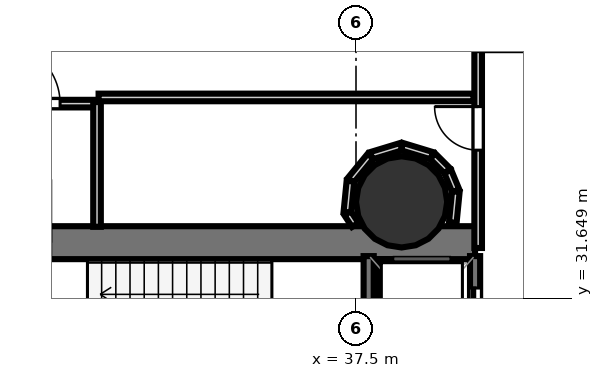
"""IFC4 building model, lengths in metres.
Left out: names, types, materials, properties, quantities, classifications, styles, units other than length and angle.
Written with IfcOpenShell. Run it as: python <this file> out.ifc"""

import sys

from ifc_helpers import new_model, si_unit, direction, frame, frame_2d, origin, origin_2d, place, context, subcontext, project, spatial, rectangle, hollow_circle, extrude, element, fill, save


model = new_model("IFC4")
c1 = context("Model", 3, precision=1e-05, world=origin(), true_north=direction((0.0, 1.0)))
c2 = subcontext(c1, "Body", "Model", "MODEL_VIEW")
j1 = project(units=[si_unit("LENGTHUNIT", "METRE"), si_unit("PLANEANGLEUNIT", "RADIAN")], contexts=[c1])
p1 = place(None, origin())
s1 = spatial("IfcSite", under=j1, at=p1, CompositionType="ELEMENT")
p2 = place(p1, origin())
s2 = spatial("IfcBuilding", under=s1, at=p2, CompositionType="ELEMENT")
p3 = place(p2, frame((0.0, 0.0, 47.9)))
s3 = spatial("IfcBuildingStorey", under=s2, at=p3, CompositionType="ELEMENT", Elevation=47.9)
p4 = place(p3, frame((29.13, 32.745, 0.0), z_axis=(0.0, 0.0, 1.0), x_axis=(1.0, 0.0, 0.0)))
e1 = element("IfcWall", 1, at=p4, inside=s3, PredefinedType="SHEAR", context=c2, shape_type="SweptSolid", body=[
    extrude(rectangle(XDim=10.72, YDim=0.65, at=frame_2d((5.36, 0.0))), origin(), (0.0, 0.0, 1.0), 4.42),
])
p5 = place(p4, frame((1.095, 0.0, 0.0)))
e2 = element("IfcOpeningElement", 2, at=p5, cuts=e1, PredefinedType="OPENING", context=c2, shape_type="SweptSolid", body=[
    extrude(rectangle(XDim=1.25, YDim=2.15, at=frame_2d((0.625, 1.075))), frame((0.0, 0.335, 0.0), z_axis=(0.0, -1.0, 0.0), x_axis=(1.0, 0.0, 0.0)), (0.0, 0.0, 1.0), 0.67),
])
p6 = place(p3, frame((38.18, 24.98, 0.0), z_axis=(0.0, 0.0, 1.0), x_axis=(0.0, 1.0, 0.0)))
e3 = element("IfcWall", 3, at=p6, inside=s3, PredefinedType="SHEAR", context=c2, shape_type="SweptSolid", body=[
    extrude(rectangle(XDim=7.44, YDim=0.5, at=frame_2d((3.72, 0.0))), origin(), (0.0, 0.0, 1.0), 4.42),
])
p7 = place(p3, frame((38.4, 33.55, 0.0), z_axis=(0.0, 0.0, 1.0), x_axis=(1.0, 0.0, 0.0)))
e4 = element("IfcColumn", 4, at=p7, inside=s3, PredefinedType="COLUMN", context=c2, shape_type="SweptSolid", body=[
    extrude(hollow_circle(Radius=0.9, WallThickness=0.045, at=origin_2d()), origin(), (0.0, 0.0, 1.0), 4.6),
])
p8 = place(p3, frame((39.85, 30.12, 0.0), z_axis=(0.0, 0.0, 1.0), x_axis=(0.0, 1.0, 0.0)))
e5 = element("IfcWall", 5, at=p8, inside=s3, PredefinedType="SOLIDWALL", context=c2, shape_type="SweptSolid", body=[
    extrude(rectangle(XDim=2.36, YDim=0.2, at=frame_2d((1.18, 0.0))), origin(), (0.0, 0.0, 1.0), 4.42),
])
p9 = place(p8, frame((0.63, 0.0, 0.0)))
e6 = element("IfcOpeningElement", 6, at=p9, cuts=e5, PredefinedType="OPENING", context=c2, shape_type="SweptSolid", body=[
    extrude(rectangle(XDim=1.1, YDim=2.15, at=frame_2d((0.55, 1.075))), frame((0.0, 0.11, 0.0), z_axis=(0.0, -1.0, 0.0), x_axis=(1.0, 0.0, 0.0)), (0.0, 0.0, 1.0), 0.22),
])
p10 = place(p3, frame((37.75, 30.12, 0.0), z_axis=(0.0, 0.0, 1.0), x_axis=(0.0, 1.0, 0.0)))
e7 = element("IfcWall", 7, at=p10, inside=s3, PredefinedType="SOLIDWALL", context=c2, shape_type="SweptSolid", body=[
    extrude(rectangle(XDim=2.36, YDim=0.2, at=frame_2d((1.18, 0.0))), origin(), (0.0, 0.0, 1.0), 4.42),
])
p11 = place(p3, frame((29.7, 35.489, 0.0), z_axis=(0.0, 0.0, 1.0), x_axis=(1.0, 0.0, 0.0)))
e8 = element("IfcWall", 8, at=p11, inside=s3, PredefinedType="PARTITIONING", context=c2, shape_type="SweptSolid", body=[
    extrude(rectangle(XDim=2.72, YDim=0.15, at=frame_2d((1.36, 0.0))), origin(), (0.0, 0.0, 1.0), 2.94),
])
p12 = place(p11, frame((0.76, 0.0, 0.0)))
e9 = element("IfcOpeningElement", 9, at=p12, cuts=e8, PredefinedType="OPENING", context=c2, shape_type="SweptSolid", body=[
    extrude(rectangle(XDim=1.2, YDim=2.15, at=frame_2d((0.6, 1.075))), frame((0.0, 0.085, 0.0), z_axis=(0.0, -1.0, 0.0), x_axis=(1.0, 0.0, 0.0)), (0.0, 0.0, 1.0), 0.17),
])
p13 = place(p3, frame((32.389, 35.52, 0.0), z_axis=(0.0, 0.0, 1.0), x_axis=(0.0, -1.0, 0.0)))
e10 = element("IfcWall", 10, at=p13, inside=s3, PredefinedType="PARTITIONING", context=c2, shape_type="SweptSolid", body=[
    extrude(rectangle(XDim=2.462, YDim=0.15, at=frame_2d((1.231, 0.0))), origin(), (0.0, 0.0, 1.0), 2.94),
])
p14 = place(p3, frame((39.911, 32.64, 0.0), z_axis=(0.0, 0.0, 1.0), x_axis=(0.0, 1.0, 0.0)))
e11 = element("IfcWall", 11, at=p14, inside=s3, PredefinedType="PARTITIONING", context=c2, shape_type="SweptSolid", body=[
    extrude(rectangle(XDim=4.01, YDim=0.15, at=frame_2d((2.005, 0.0))), origin(), (0.0, 0.0, 1.0), 2.94),
])
p15 = place(p14, frame((1.93, 0.0, 0.0)))
e12 = element("IfcOpeningElement", 12, at=p15, cuts=e11, PredefinedType="OPENING", context=c2, shape_type="SweptSolid", body=[
    extrude(rectangle(XDim=0.86, YDim=2.05, at=frame_2d((0.43, 1.025))), frame((0.0, 0.085, 0.0), z_axis=(0.0, -1.0, 0.0), x_axis=(1.0, 0.0, 0.0)), (0.0, 0.0, 1.0), 0.17),
])
p16 = place(p3, frame((39.818, 35.611, 0.0), z_axis=(0.0, 0.0, 1.0), x_axis=(-1.0, 0.0, 0.0)))
e13 = element("IfcWall", 13, at=p16, inside=s3, PredefinedType="PARTITIONING", context=c2, shape_type="SweptSolid", body=[
    extrude(rectangle(XDim=7.398, YDim=0.15, at=frame_2d((3.699, 0.0))), origin(), (0.0, 0.0, 1.0), 2.94),
])
p17 = place(p3, frame((39.41, 33.141, 0.0), z_axis=(0.0, 0.0, 1.0), x_axis=(0.09797199107, 0.995189172452, 0.0)))
e14 = element("IfcWall", 14, at=p17, inside=s3, PredefinedType="PARTITIONING", context=c2, shape_type="SweptSolid", body=[
    extrude(rectangle(XDim=0.615, YDim=0.15, at=frame_2d((0.308, 0.0))), origin(), (0.0, 0.0, 1.0), 2.94),
])
for number, where, z_axis, x_axis in (
    (15, (39.468, 33.769, 0.0), (0.0, 0.0, 1.0), (-0.383, 0.924, 0.0)),
    (16, (39.303, 34.161, 0.0), (0.0, 0.0, 1.0), (-0.707, 0.707, 0.0)),
):
    element("IfcWall", number, at=place(p3, frame(where, z_axis=z_axis, x_axis=x_axis)), inside=s3, PredefinedType="PARTITIONING", context=c2, shape_type="SweptSolid", body=[
        extrude(rectangle(XDim=0.414, YDim=0.15, at=frame_2d((0.207, 0.0))), origin(), (0.0, 0.0, 1.0), 2.94),
    ])
p18 = place(p3, frame((38.998, 34.461, 0.0), z_axis=(0.0, 0.0, 1.0), x_axis=(-0.956904203315, 0.290403763195, 0.0)))
e17 = element("IfcWall", 17, at=p18, inside=s3, PredefinedType="PARTITIONING", context=c2, shape_type="SweptSolid", body=[
    extrude(rectangle(XDim=0.615, YDim=0.15, at=frame_2d((0.308, 0.0))), origin(), (0.0, 0.0, 1.0), 2.94),
])
p19 = place(p3, frame((38.391, 34.64, 0.0), z_axis=(0.0, 0.0, 1.0), x_axis=(-0.956937641938, -0.290293557355, 0.0)))
e18 = element("IfcWall", 18, at=p19, inside=s3, PredefinedType="PARTITIONING", context=c2, shape_type="SweptSolid", body=[
    extrude(rectangle(XDim=0.616, YDim=0.15, at=frame_2d((0.308, 0.0))), origin(), (0.0, 0.0, 1.0), 2.94),
])
p20 = place(p3, frame((37.787, 34.451, 0.0), z_axis=(0.0, 0.0, 1.0), x_axis=(-0.634468611637, -0.77294862756, 0.0)))
e19 = element("IfcWall", 19, at=p20, inside=s3, PredefinedType="PARTITIONING", context=c2, shape_type="SweptSolid", body=[
    extrude(rectangle(XDim=0.615, YDim=0.15, at=frame_2d((0.308, 0.0))), origin(), (0.0, 0.0, 1.0), 2.94),
])
p21 = place(p3, frame((37.39, 33.959, 0.0), z_axis=(0.0, 0.0, 1.0), x_axis=(-0.09797199107, -0.995189172452, 0.0)))
e20 = element("IfcWall", 20, at=p21, inside=s3, PredefinedType="PARTITIONING", context=c2, shape_type="SweptSolid", body=[
    extrude(rectangle(XDim=0.615, YDim=0.15, at=frame_2d((0.308, 0.0))), origin(), (0.0, 0.0, 1.0), 2.94),
])
p22 = place(p3, frame((37.334, 33.326, 0.0), z_axis=(0.0, 0.0, 1.0), x_axis=(0.544613558839, -0.838687111817, 0.0)))
e21 = element("IfcWall", 21, at=p22, inside=s3, PredefinedType="PARTITIONING", context=c2, shape_type="SweptSolid", body=[
    extrude(rectangle(XDim=0.275, YDim=0.15, at=frame_2d((0.137, 0.0))), origin(), (0.0, 0.0, 1.0), 2.94),
])
p23 = place(p9, origin())
e22 = element("IfcDoor", 22, at=p23, inside=s3, OperationType="SLIDING_TO_LEFT", PredefinedType="DOOR", context=c2, shape_type="SweptSolid", body=[
    extrude(rectangle(XDim=1.1, YDim=2.15, at=frame_2d((0.55, 1.075))), frame((0.0, 0.025, 0.0), z_axis=(0.0, -1.0, 0.0), x_axis=(1.0, 0.0, 0.0)), (0.0, 0.0, 1.0), 0.05),
])
fill(e6, e22)
p24 = place(p12, origin())
e23 = element("IfcDoor", 23, at=p24, inside=s3, OperationType="SINGLE_SWING_LEFT", PredefinedType="DOOR", context=c2, shape_type="SweptSolid", body=[
    extrude(rectangle(XDim=1.2, YDim=2.15, at=frame_2d((0.6, 1.075))), frame((0.0, 0.025, 0.0), z_axis=(0.0, -1.0, 0.0), x_axis=(1.0, 0.0, 0.0)), (0.0, 0.0, 1.0), 0.05),
])
fill(e9, e23)
p25 = place(p15, origin())
e24 = element("IfcDoor", 24, at=p25, inside=s3, OperationType="SINGLE_SWING_RIGHT", PredefinedType="DOOR", context=c2, shape_type="SweptSolid", body=[
    extrude(rectangle(XDim=0.86, YDim=2.05, at=frame_2d((0.43, 1.025))), frame((0.0, 0.025, 0.0), z_axis=(0.0, -1.0, 0.0), x_axis=(1.0, 0.0, 0.0)), (0.0, 0.0, 1.0), 0.05),
])
fill(e12, e24)
save(model, sys.argv[1])
